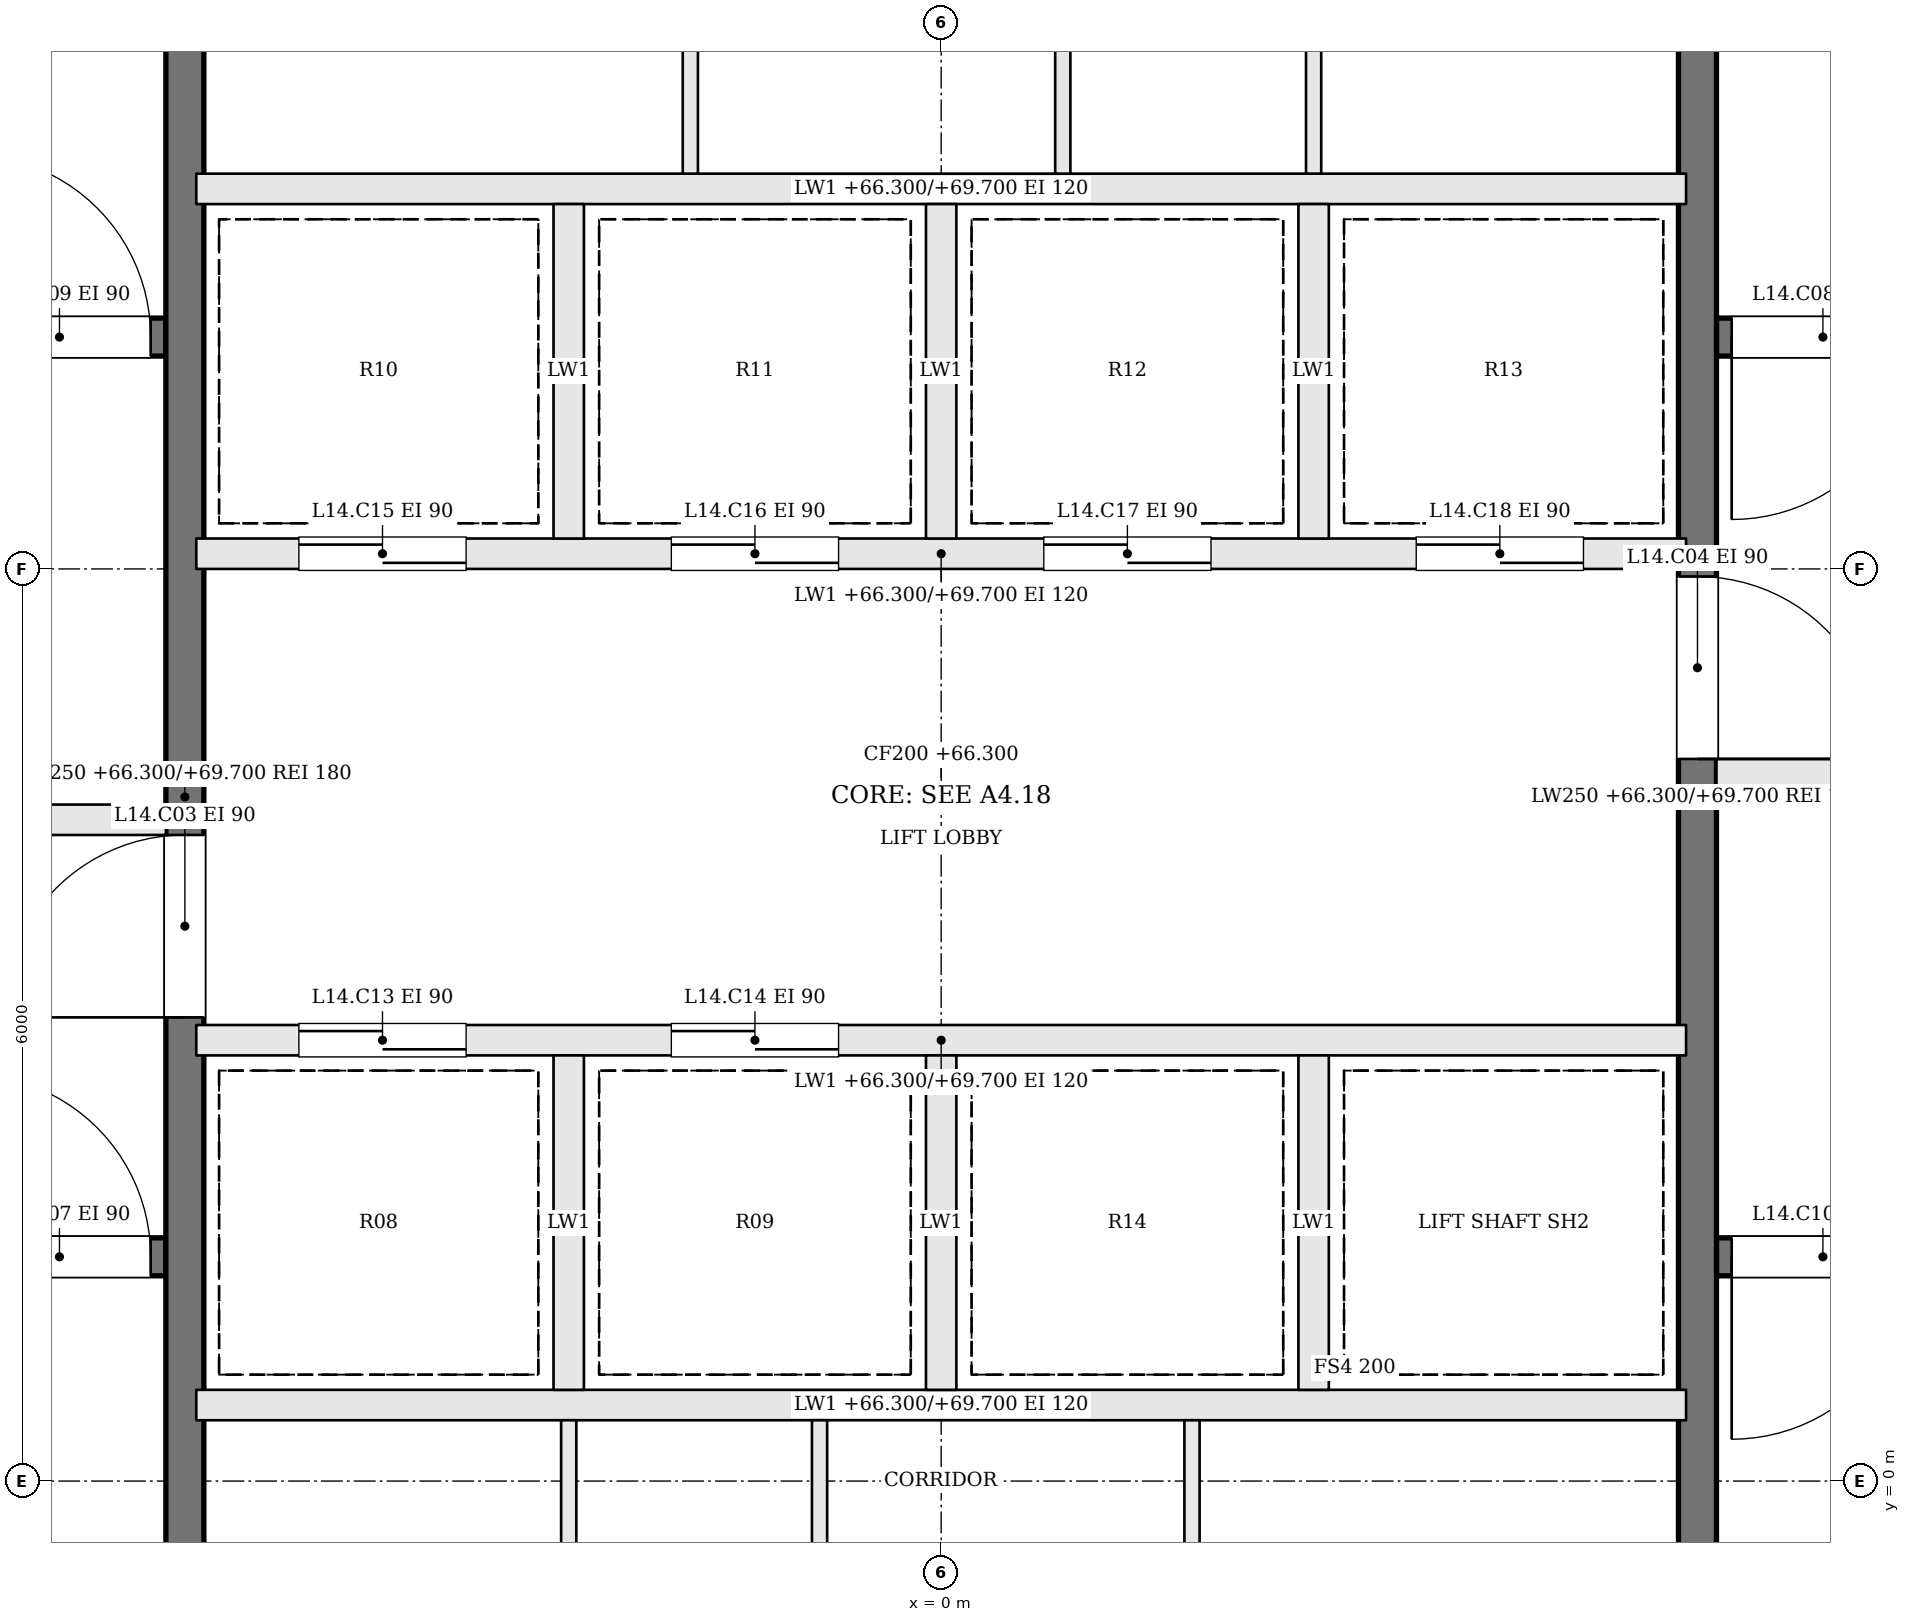
"""IFC4 building model, lengths in metres.
Left out: names, types, materials, properties, quantities, classifications, styles, units other than length and angle.
Written with IfcOpenShell. Run it as: python <this file> out.ifc"""

import sys

from ifc_helpers import new_model, si_unit, direction, frame, frame_2d, origin, place, context, subcontext, project, spatial, rectangle, extrude, element, fill, save


model = new_model("IFC4")
c1 = context("Model", 3, precision=1e-05, world=origin(), true_north=direction((0.0, 1.0)))
c2 = subcontext(c1, "Body", "Model", "MODEL_VIEW")
j1 = project(units=[si_unit("LENGTHUNIT", "METRE"), si_unit("PLANEANGLEUNIT", "RADIAN")], contexts=[c1])
p1 = place(None, origin())
s1 = spatial("IfcSite", under=j1, at=p1, CompositionType="ELEMENT")
p2 = place(p1, origin())
s2 = spatial("IfcBuilding", under=s1, at=p2, CompositionType="ELEMENT")
p3 = place(p2, frame((0.0, 0.0, 66.3)))
s3 = spatial("IfcBuildingStorey", under=s2, at=p3, CompositionType="ELEMENT", Elevation=66.3)
p4 = place(p3, frame((-11.6, 1.475, 0.0), z_axis=(0.0, 0.0, 1.0), x_axis=(1.0, 0.0, 0.0)))
e1 = element("IfcWall", 1, at=p4, inside=s3, PredefinedType="SOLIDWALL", context=c2, shape_type="SweptSolid", body=[
    extrude(rectangle(XDim=6.5, YDim=0.25, at=frame_2d((3.25, 0.0))), origin(), (0.0, 0.0, 1.0), 3.4),
])
p5 = place(p4, frame((5.2, 0.0, 0.0)))
e2 = element("IfcOpeningElement", 2, at=p5, cuts=e1, PredefinedType="OPENING", context=c2, shape_type="SweptSolid", body=[
    extrude(rectangle(XDim=1.2, YDim=2.1, at=frame_2d((0.6, 1.05))), frame((0.0, 0.135, 0.0), z_axis=(0.0, -1.0, 0.0), x_axis=(1.0, 0.0, 0.0)), (0.0, 0.0, 1.0), 0.27),
])
p6 = place(p3, frame((11.6, 7.525, 0.0), z_axis=(0.0, 0.0, 1.0), x_axis=(-1.0, 0.0, 0.0)))
e3 = element("IfcWall", 3, at=p6, inside=s3, PredefinedType="SOLIDWALL", context=c2, shape_type="SweptSolid", body=[
    extrude(rectangle(XDim=6.5, YDim=0.25, at=frame_2d((3.25, 0.0))), origin(), (0.0, 0.0, 1.0), 3.4),
])
p7 = place(p6, frame((5.2, 0.0, 0.0)))
e4 = element("IfcOpeningElement", 4, at=p7, cuts=e3, PredefinedType="OPENING", context=c2, shape_type="SweptSolid", body=[
    extrude(rectangle(XDim=1.2, YDim=2.1, at=frame_2d((0.6, 1.05))), frame((0.0, 0.135, 0.0), z_axis=(0.0, -1.0, 0.0), x_axis=(1.0, 0.0, 0.0)), (0.0, 0.0, 1.0), 0.27),
])
p8 = place(p3, frame((-11.6, 4.35, 0.0), z_axis=(0.0, 0.0, 1.0), x_axis=(1.0, 0.0, 0.0)))
e5 = element("IfcWall", 5, at=p8, inside=s3, PredefinedType="SOLIDWALL", context=c2, shape_type="SweptSolid", body=[
    extrude(rectangle(XDim=6.5, YDim=0.2, at=frame_2d((3.25, 0.0))), origin(), (0.0, 0.0, 1.0), 3.4),
])
p9 = place(p8, frame((3.8, 0.0, 0.0)))
e6 = element("IfcOpeningElement", 6, at=p9, cuts=e5, PredefinedType="OPENING", context=c2, shape_type="SweptSolid", body=[
    extrude(rectangle(XDim=1.2, YDim=2.1, at=frame_2d((0.6, 1.05))), frame((0.0, 0.11, 0.0), z_axis=(0.0, -1.0, 0.0), x_axis=(1.0, 0.0, 0.0)), (0.0, 0.0, 1.0), 0.22),
])
p10 = place(p8, frame((0.5, 0.0, 0.0)))
e7 = element("IfcOpeningElement", 7, at=p10, cuts=e5, PredefinedType="OPENING", context=c2, shape_type="SweptSolid", body=[
    extrude(rectangle(XDim=1.2, YDim=2.1, at=frame_2d((0.6, 1.05))), frame((0.0, 0.11, 0.0), z_axis=(0.0, -1.0, 0.0), x_axis=(1.0, 0.0, 0.0)), (0.0, 0.0, 1.0), 0.22),
])
p11 = place(p3, frame((11.6, 4.65, 0.0), z_axis=(0.0, 0.0, 1.0), x_axis=(-1.0, 0.0, 0.0)))
e8 = element("IfcWall", 8, at=p11, inside=s3, PredefinedType="SOLIDWALL", context=c2, shape_type="SweptSolid", body=[
    extrude(rectangle(XDim=6.5, YDim=0.2, at=frame_2d((3.25, 0.0))), origin(), (0.0, 0.0, 1.0), 3.4),
])
p12 = place(p11, frame((3.8, 0.0, 0.0)))
e9 = element("IfcOpeningElement", 9, at=p12, cuts=e8, PredefinedType="OPENING", context=c2, shape_type="SweptSolid", body=[
    extrude(rectangle(XDim=1.2, YDim=2.1, at=frame_2d((0.6, 1.05))), frame((0.0, 0.11, 0.0), z_axis=(0.0, -1.0, 0.0), x_axis=(1.0, 0.0, 0.0)), (0.0, 0.0, 1.0), 0.22),
])
p13 = place(p11, frame((0.5, 0.0, 0.0)))
e10 = element("IfcOpeningElement", 10, at=p13, cuts=e8, PredefinedType="OPENING", context=c2, shape_type="SweptSolid", body=[
    extrude(rectangle(XDim=1.2, YDim=2.1, at=frame_2d((0.6, 1.05))), frame((0.0, 0.11, 0.0), z_axis=(0.0, -1.0, 0.0), x_axis=(1.0, 0.0, 0.0)), (0.0, 0.0, 1.0), 0.22),
])
p14 = place(p3, frame((-11.6, 7.525, 0.0), z_axis=(0.0, 0.0, 1.0), x_axis=(1.0, 0.0, 0.0)))
e11 = element("IfcWall", 11, at=p14, inside=s3, PredefinedType="SOLIDWALL", context=c2, shape_type="SweptSolid", body=[
    extrude(rectangle(XDim=6.5, YDim=0.25, at=frame_2d((3.25, 0.0))), origin(), (0.0, 0.0, 1.0), 3.4),
])
p15 = place(p14, frame((5.2, 0.0, 0.0)))
e12 = element("IfcOpeningElement", 12, at=p15, cuts=e11, PredefinedType="OPENING", context=c2, shape_type="SweptSolid", body=[
    extrude(rectangle(XDim=1.2, YDim=2.1, at=frame_2d((0.6, 1.05))), frame((0.0, 0.135, 0.0), z_axis=(0.0, -1.0, 0.0), x_axis=(1.0, 0.0, 0.0)), (0.0, 0.0, 1.0), 0.27),
])
p16 = place(p3, frame((11.6, 1.475, 0.0), z_axis=(0.0, 0.0, 1.0), x_axis=(-1.0, 0.0, 0.0)))
e13 = element("IfcWall", 13, at=p16, inside=s3, PredefinedType="SOLIDWALL", context=c2, shape_type="SweptSolid", body=[
    extrude(rectangle(XDim=6.5, YDim=0.25, at=frame_2d((3.25, 0.0))), origin(), (0.0, 0.0, 1.0), 3.4),
])
p17 = place(p16, frame((5.2, 0.0, 0.0)))
e14 = element("IfcOpeningElement", 14, at=p17, cuts=e13, PredefinedType="OPENING", context=c2, shape_type="SweptSolid", body=[
    extrude(rectangle(XDim=1.2, YDim=2.1, at=frame_2d((0.6, 1.05))), frame((0.0, 0.135, 0.0), z_axis=(0.0, -1.0, 0.0), x_axis=(1.0, 0.0, 0.0)), (0.0, 0.0, 1.0), 0.27),
])
p18 = place(p3, frame((-4.975, -1.6, 0.0), z_axis=(0.0, 0.0, 1.0), x_axis=(0.0, 1.0, 0.0)))
e15 = element("IfcWall", 15, at=p18, inside=s3, PredefinedType="SOLIDWALL", context=c2, shape_type="SweptSolid", body=[
    extrude(rectangle(XDim=12.2, YDim=0.25, at=frame_2d((6.1, 0.0))), origin(), (0.0, 0.0, 1.0), 3.4),
])
p19 = place(p18, frame((4.65, 0.0, 0.0)))
e16 = element("IfcOpeningElement", 16, at=p19, cuts=e15, PredefinedType="OPENING", context=c2, shape_type="SweptSolid", body=[
    extrude(rectangle(XDim=1.2, YDim=2.1, at=frame_2d((0.6, 1.05))), frame((0.0, 0.135, 0.0), z_axis=(0.0, -1.0, 0.0), x_axis=(1.0, 0.0, 0.0)), (0.0, 0.0, 1.0), 0.27),
])
p20 = place(p3, frame((4.975, 10.6, 0.0), z_axis=(0.0, 0.0, 1.0), x_axis=(0.0, -1.0, 0.0)))
e17 = element("IfcWall", 17, at=p20, inside=s3, PredefinedType="SOLIDWALL", context=c2, shape_type="SweptSolid", body=[
    extrude(rectangle(XDim=12.2, YDim=0.25, at=frame_2d((6.1, 0.0))), origin(), (0.0, 0.0, 1.0), 3.4),
])
p21 = place(p20, frame((4.65, 0.0, 0.0)))
e18 = element("IfcOpeningElement", 18, at=p21, cuts=e17, PredefinedType="OPENING", context=c2, shape_type="SweptSolid", body=[
    extrude(rectangle(XDim=1.2, YDim=2.1, at=frame_2d((0.6, 1.05))), frame((0.0, 0.135, 0.0), z_axis=(0.0, -1.0, 0.0), x_axis=(1.0, 0.0, 0.0)), (0.0, 0.0, 1.0), 0.27),
])
p22 = place(p3, frame((-4.9, 0.5, 0.0), z_axis=(0.0, 0.0, 1.0), x_axis=(1.0, 0.0, 0.0)))
e19 = element("IfcWall", 19, at=p22, inside=s3, PredefinedType="SOLIDWALL", context=c2, shape_type="SweptSolid", body=[
    extrude(rectangle(XDim=9.8, YDim=0.2, at=frame_2d((4.9, 0.0))), origin(), (0.0, 0.0, 1.0), 3.4),
])
p23 = place(p3, frame((-4.9, 2.9, 0.0), z_axis=(0.0, 0.0, 1.0), x_axis=(1.0, 0.0, 0.0)))
e20 = element("IfcWall", 20, at=p23, inside=s3, PredefinedType="SOLIDWALL", context=c2, shape_type="SweptSolid", body=[
    extrude(rectangle(XDim=9.8, YDim=0.2, at=frame_2d((4.9, 0.0))), origin(), (0.0, 0.0, 1.0), 3.4),
])
p24 = place(p23, frame((0.675, 0.0, 0.0)))
e21 = element("IfcOpeningElement", 21, at=p24, cuts=e20, PredefinedType="OPENING", context=c2, shape_type="SweptSolid", body=[
    extrude(rectangle(XDim=1.1, YDim=2.1, at=frame_2d((0.55, 1.05))), frame((0.0, 0.11, 0.0), z_axis=(0.0, -1.0, 0.0), x_axis=(1.0, 0.0, 0.0)), (0.0, 0.0, 1.0), 0.22),
])
p25 = place(p23, frame((3.125, 0.0, 0.0)))
e22 = element("IfcOpeningElement", 22, at=p25, cuts=e20, PredefinedType="OPENING", context=c2, shape_type="SweptSolid", body=[
    extrude(rectangle(XDim=1.1, YDim=2.1, at=frame_2d((0.55, 1.05))), frame((0.0, 0.11, 0.0), z_axis=(0.0, -1.0, 0.0), x_axis=(1.0, 0.0, 0.0)), (0.0, 0.0, 1.0), 0.22),
])
p26 = place(p3, frame((-4.9, 6.1, 0.0), z_axis=(0.0, 0.0, 1.0), x_axis=(1.0, 0.0, 0.0)))
e23 = element("IfcWall", 23, at=p26, inside=s3, PredefinedType="SOLIDWALL", context=c2, shape_type="SweptSolid", body=[
    extrude(rectangle(XDim=9.8, YDim=0.2, at=frame_2d((4.9, 0.0))), origin(), (0.0, 0.0, 1.0), 3.4),
])
p27 = place(p26, frame((0.675, 0.0, 0.0)))
e24 = element("IfcOpeningElement", 24, at=p27, cuts=e23, PredefinedType="OPENING", context=c2, shape_type="SweptSolid", body=[
    extrude(rectangle(XDim=1.1, YDim=2.1, at=frame_2d((0.55, 1.05))), frame((0.0, 0.11, 0.0), z_axis=(0.0, -1.0, 0.0), x_axis=(1.0, 0.0, 0.0)), (0.0, 0.0, 1.0), 0.22),
])
p28 = place(p26, frame((3.125, 0.0, 0.0)))
e25 = element("IfcOpeningElement", 25, at=p28, cuts=e23, PredefinedType="OPENING", context=c2, shape_type="SweptSolid", body=[
    extrude(rectangle(XDim=1.1, YDim=2.1, at=frame_2d((0.55, 1.05))), frame((0.0, 0.11, 0.0), z_axis=(0.0, -1.0, 0.0), x_axis=(1.0, 0.0, 0.0)), (0.0, 0.0, 1.0), 0.22),
])
p29 = place(p26, frame((5.575, 0.0, 0.0)))
e26 = element("IfcOpeningElement", 26, at=p29, cuts=e23, PredefinedType="OPENING", context=c2, shape_type="SweptSolid", body=[
    extrude(rectangle(XDim=1.1, YDim=2.1, at=frame_2d((0.55, 1.05))), frame((0.0, 0.11, 0.0), z_axis=(0.0, -1.0, 0.0), x_axis=(1.0, 0.0, 0.0)), (0.0, 0.0, 1.0), 0.22),
])
p30 = place(p26, frame((8.025, 0.0, 0.0)))
e27 = element("IfcOpeningElement", 27, at=p30, cuts=e23, PredefinedType="OPENING", context=c2, shape_type="SweptSolid", body=[
    extrude(rectangle(XDim=1.1, YDim=2.1, at=frame_2d((0.55, 1.05))), frame((0.0, 0.11, 0.0), z_axis=(0.0, -1.0, 0.0), x_axis=(1.0, 0.0, 0.0)), (0.0, 0.0, 1.0), 0.22),
])
p31 = place(p3, frame((-4.9, 8.5, 0.0), z_axis=(0.0, 0.0, 1.0), x_axis=(1.0, 0.0, 0.0)))
e28 = element("IfcWall", 28, at=p31, inside=s3, PredefinedType="SOLIDWALL", context=c2, shape_type="SweptSolid", body=[
    extrude(rectangle(XDim=9.8, YDim=0.2, at=frame_2d((4.9, 0.0))), origin(), (0.0, 0.0, 1.0), 3.4),
])
for number, where, z_axis, x_axis in (
    (29, (-2.45, 0.6, 0.0), (0.0, 0.0, 1.0), (0.0, 1.0, 0.0)),
    (30, (0.0, 0.6, 0.0), (0.0, 0.0, 1.0), (0.0, 1.0, 0.0)),
    (31, (2.45, 0.6, 0.0), (0.0, 0.0, 1.0), (0.0, 1.0, 0.0)),
    (32, (-2.45, 6.2, 0.0), (0.0, 0.0, 1.0), (0.0, 1.0, 0.0)),
    (33, (0.0, 6.2, 0.0), (0.0, 0.0, 1.0), (0.0, 1.0, 0.0)),
    (34, (2.45, 6.2, 0.0), (0.0, 0.0, 1.0), (0.0, 1.0, 0.0)),
):
    element("IfcWall", number, at=place(p3, frame(where, z_axis=z_axis, x_axis=x_axis)), inside=s3, PredefinedType="SOLIDWALL", context=c2, shape_type="SweptSolid", body=[
        extrude(rectangle(XDim=2.2, YDim=0.2, at=frame_2d((1.1, 0.0))), origin(), (0.0, 0.0, 1.0), 3.4),
    ])
for number, where, z_axis, x_axis in (
    (35, (-2.45, -1.6, 0.0), (0.0, 0.0, 1.0), (0.0, 1.0, 0.0)),
    (36, (-0.8, -1.6, 0.0), (0.0, 0.0, 1.0), (0.0, 1.0, 0.0)),
    (37, (1.65, -1.6, 0.0), (0.0, 0.0, 1.0), (0.0, 1.0, 0.0)),
    (38, (-1.65, 8.6, 0.0), (0.0, 0.0, 1.0), (0.0, 1.0, 0.0)),
    (39, (0.8, 8.6, 0.0), (0.0, 0.0, 1.0), (0.0, 1.0, 0.0)),
    (40, (2.45, 8.6, 0.0), (0.0, 0.0, 1.0), (0.0, 1.0, 0.0)),
):
    element("IfcWall", number, at=place(p3, frame(where, z_axis=z_axis, x_axis=x_axis)), inside=s3, PredefinedType="PARTITIONING", context=c2, shape_type="SweptSolid", body=[
        extrude(rectangle(XDim=2.0, YDim=0.1, at=frame_2d((1.0, 0.0))), origin(), (0.0, 0.0, 1.0), 3.4),
    ])
p32 = place(p19, origin())
e41 = element("IfcDoor", 41, at=p32, inside=s3, OperationType="SINGLE_SWING_LEFT", PredefinedType="DOOR", context=c2, shape_type="SweptSolid", body=[
    extrude(rectangle(XDim=1.2, YDim=2.1, at=frame_2d((0.6, 1.05))), frame((0.0, 0.025, 0.0), z_axis=(0.0, -1.0, 0.0), x_axis=(1.0, 0.0, 0.0)), (0.0, 0.0, 1.0), 0.05),
])
fill(e16, e41)
p33 = place(p21, origin())
e42 = element("IfcDoor", 42, at=p33, inside=s3, OperationType="SINGLE_SWING_RIGHT", PredefinedType="DOOR", context=c2, shape_type="SweptSolid", body=[
    extrude(rectangle(XDim=1.2, YDim=2.1, at=frame_2d((0.6, 1.05))), frame((0.0, 0.025, 0.0), z_axis=(0.0, -1.0, 0.0), x_axis=(1.0, 0.0, 0.0)), (0.0, 0.0, 1.0), 0.05),
])
fill(e18, e42)
p34 = place(p5, origin())
e43 = element("IfcDoor", 43, at=p34, inside=s3, OperationType="SINGLE_SWING_LEFT", PredefinedType="DOOR", context=c2, shape_type="SweptSolid", body=[
    extrude(rectangle(XDim=1.2, YDim=2.1, at=frame_2d((0.6, 1.05))), frame((0.0, 0.025, 0.0), z_axis=(0.0, -1.0, 0.0), x_axis=(1.0, 0.0, 0.0)), (0.0, 0.0, 1.0), 0.05),
])
fill(e2, e43)
p35 = place(p7, origin())
e44 = element("IfcDoor", 44, at=p35, inside=s3, OperationType="SINGLE_SWING_RIGHT", PredefinedType="DOOR", context=c2, shape_type="SweptSolid", body=[
    extrude(rectangle(XDim=1.2, YDim=2.1, at=frame_2d((0.6, 1.05))), frame((0.0, 0.025, 0.0), z_axis=(0.0, -1.0, 0.0), x_axis=(1.0, 0.0, 0.0)), (0.0, 0.0, 1.0), 0.05),
])
fill(e4, e44)
p36 = place(p15, origin())
e45 = element("IfcDoor", 45, at=p36, inside=s3, OperationType="SINGLE_SWING_LEFT", PredefinedType="DOOR", context=c2, shape_type="SweptSolid", body=[
    extrude(rectangle(XDim=1.2, YDim=2.1, at=frame_2d((0.6, 1.05))), frame((0.0, 0.025, 0.0), z_axis=(0.0, -1.0, 0.0), x_axis=(1.0, 0.0, 0.0)), (0.0, 0.0, 1.0), 0.05),
])
fill(e12, e45)
p37 = place(p17, origin())
e46 = element("IfcDoor", 46, at=p37, inside=s3, OperationType="SINGLE_SWING_RIGHT", PredefinedType="DOOR", context=c2, shape_type="SweptSolid", body=[
    extrude(rectangle(XDim=1.2, YDim=2.1, at=frame_2d((0.6, 1.05))), frame((0.0, 0.025, 0.0), z_axis=(0.0, -1.0, 0.0), x_axis=(1.0, 0.0, 0.0)), (0.0, 0.0, 1.0), 0.05),
])
fill(e14, e46)
p38 = place(p24, origin())
e47 = element("IfcDoor", 47, at=p38, inside=s3, OperationType="SLIDING_TO_RIGHT", PredefinedType="DOOR", context=c2, shape_type="SweptSolid", body=[
    extrude(rectangle(XDim=1.1, YDim=2.1, at=frame_2d((0.55, 1.05))), frame((0.0, 0.025, 0.0), z_axis=(0.0, -1.0, 0.0), x_axis=(1.0, 0.0, 0.0)), (0.0, 0.0, 1.0), 0.05),
])
fill(e21, e47)
p39 = place(p25, origin())
e48 = element("IfcDoor", 48, at=p39, inside=s3, OperationType="SLIDING_TO_LEFT", PredefinedType="DOOR", context=c2, shape_type="SweptSolid", body=[
    extrude(rectangle(XDim=1.1, YDim=2.1, at=frame_2d((0.55, 1.05))), frame((0.0, 0.025, 0.0), z_axis=(0.0, -1.0, 0.0), x_axis=(1.0, 0.0, 0.0)), (0.0, 0.0, 1.0), 0.05),
])
fill(e22, e48)
p40 = place(p27, origin())
e49 = element("IfcDoor", 49, at=p40, inside=s3, OperationType="SLIDING_TO_RIGHT", PredefinedType="DOOR", context=c2, shape_type="SweptSolid", body=[
    extrude(rectangle(XDim=1.1, YDim=2.1, at=frame_2d((0.55, 1.05))), frame((0.0, 0.025, 0.0), z_axis=(0.0, -1.0, 0.0), x_axis=(1.0, 0.0, 0.0)), (0.0, 0.0, 1.0), 0.05),
])
fill(e24, e49)
p41 = place(p28, origin())
e50 = element("IfcDoor", 50, at=p41, inside=s3, OperationType="SLIDING_TO_LEFT", PredefinedType="DOOR", context=c2, shape_type="SweptSolid", body=[
    extrude(rectangle(XDim=1.1, YDim=2.1, at=frame_2d((0.55, 1.05))), frame((0.0, 0.025, 0.0), z_axis=(0.0, -1.0, 0.0), x_axis=(1.0, 0.0, 0.0)), (0.0, 0.0, 1.0), 0.05),
])
fill(e25, e50)
p42 = place(p29, origin())
e51 = element("IfcDoor", 51, at=p42, inside=s3, OperationType="SLIDING_TO_RIGHT", PredefinedType="DOOR", context=c2, shape_type="SweptSolid", body=[
    extrude(rectangle(XDim=1.1, YDim=2.1, at=frame_2d((0.55, 1.05))), frame((0.0, 0.025, 0.0), z_axis=(0.0, -1.0, 0.0), x_axis=(1.0, 0.0, 0.0)), (0.0, 0.0, 1.0), 0.05),
])
fill(e26, e51)
p43 = place(p30, origin())
e52 = element("IfcDoor", 52, at=p43, inside=s3, OperationType="SLIDING_TO_LEFT", PredefinedType="DOOR", context=c2, shape_type="SweptSolid", body=[
    extrude(rectangle(XDim=1.1, YDim=2.1, at=frame_2d((0.55, 1.05))), frame((0.0, 0.025, 0.0), z_axis=(0.0, -1.0, 0.0), x_axis=(1.0, 0.0, 0.0)), (0.0, 0.0, 1.0), 0.05),
])
fill(e27, e52)
save(model, sys.argv[1])
